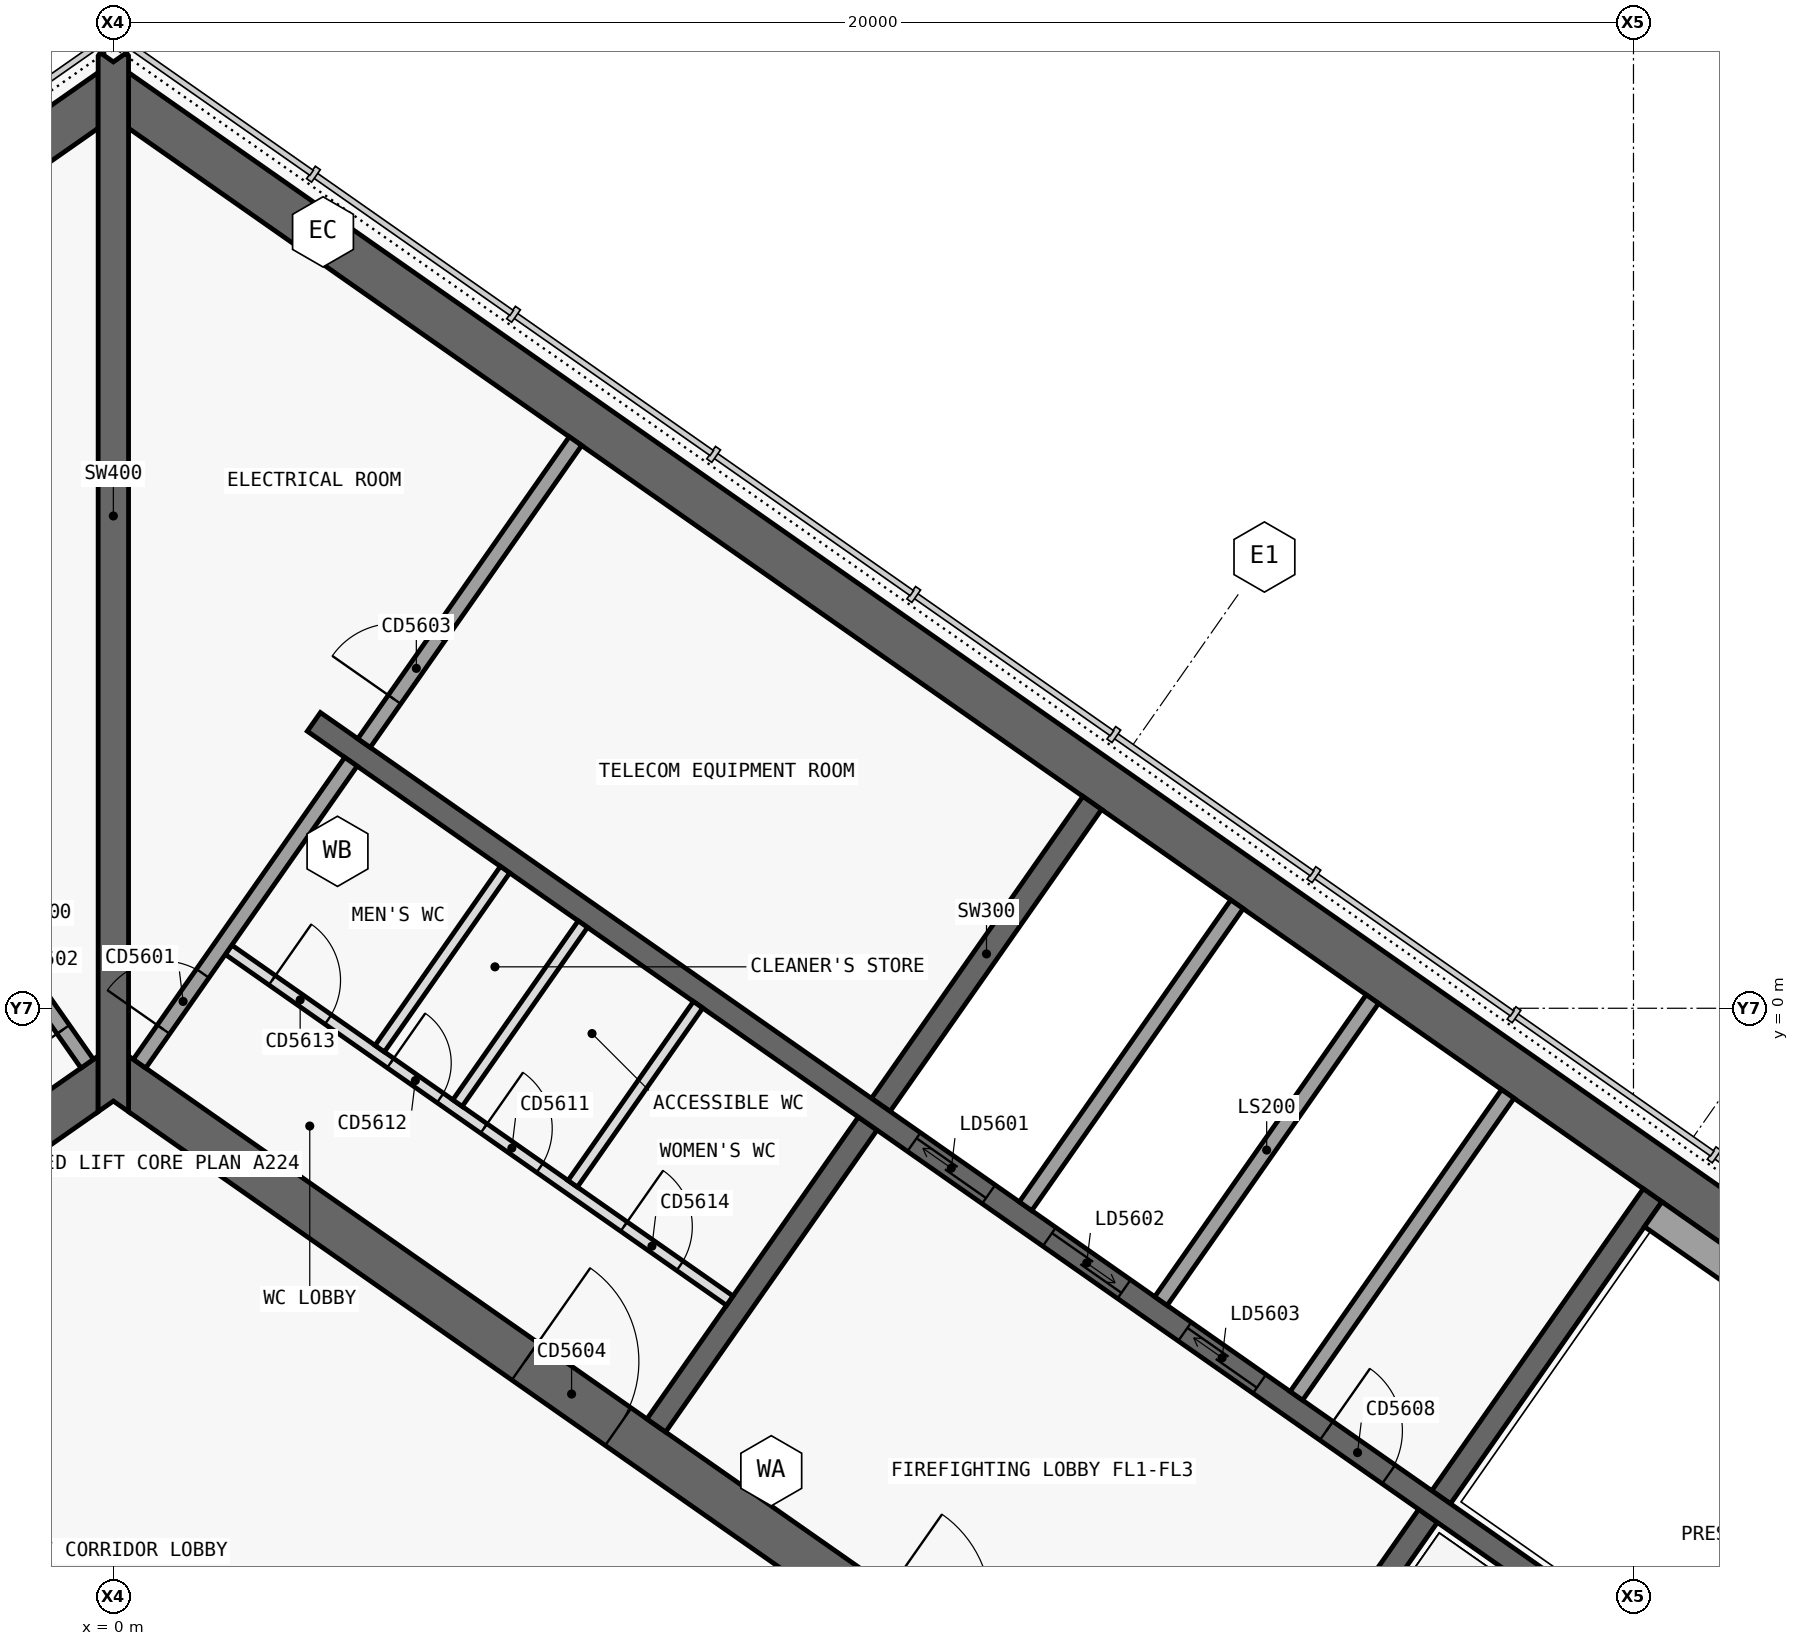
"""IFC4 building model, lengths in metres.
Left out: names, types, materials, properties, quantities, classifications, styles, units other than length and angle.
Written with IfcOpenShell. Run it as: python <this file> out.ifc"""

import sys

from ifc_helpers import new_model, si_unit, direction, frame, frame_2d, origin, place, context, subcontext, project, spatial, polyline, rectangle, outline, extrude, element, fill, save


model = new_model("IFC4")
c1 = context("Model", 3, precision=1e-05, world=origin(), true_north=direction((0.0, 1.0)))
c2 = subcontext(c1, "Body", "Model", "MODEL_VIEW")
j1 = project(units=[si_unit("LENGTHUNIT", "METRE"), si_unit("PLANEANGLEUNIT", "RADIAN")], contexts=[c1])
p1 = place(None, origin())
s1 = spatial("IfcSite", under=j1, at=p1, CompositionType="ELEMENT")
p2 = place(p1, origin())
s2 = spatial("IfcBuilding", under=s1, at=p2, CompositionType="ELEMENT")
p3 = place(p2, frame((0.0, 0.0, 313.3)))
s3 = spatial("IfcBuildingStorey", under=s2, at=p3, CompositionType="ELEMENT", Elevation=313.3)
p4 = place(p3, frame((-0.028, 12.066, 0.0), z_axis=(0.0, 0.0, 1.0), x_axis=(-0.819151382952, -0.573577380837, 0.0)))
e1 = element("IfcWall", 1, at=p4, inside=s3, PredefinedType="SHEAR", context=c2, shape_type="SweptSolid", body=[
    extrude(outline(polyline([(33.898, 0.3), (0.42, 0.3), (0.0, -0.3), (33.898, -0.3), (33.898, 0.3)])), origin(), (0.0, 0.0, 1.0), 5.5),
])
p5 = place(p3, frame((-0.028, -0.874, 0.0), z_axis=(0.0, 0.0, 1.0), x_axis=(-0.819150035022, -0.573579305871, 0.0)))
e2 = element("IfcWall", 2, at=p5, inside=s3, PredefinedType="SHEAR", context=c2, shape_type="SweptSolid", body=[
    extrude(outline(polyline([(26.476, 0.3), (0.42, 0.3), (0.0, -0.3), (26.476, -0.3), (26.476, 0.3)])), origin(), (0.0, 0.0, 1.0), 5.5),
])
p6 = place(p5, frame((3.676, 0.0, 0.0)))
e3 = element("IfcOpeningElement", 3, at=p6, cuts=e2, PredefinedType="OPENING", context=c2, shape_type="SweptSolid", body=[
    extrude(rectangle(XDim=1.2, YDim=2.1, at=frame_2d((0.6, 1.05))), frame((0.0, 0.31, 0.0), z_axis=(0.0, -1.0, 0.0), x_axis=(1.0, 0.0, 0.0)), (0.0, 0.0, 1.0), 0.62),
])
p7 = place(p5, frame((12.376, 0.0, 0.0)))
e4 = element("IfcOpeningElement", 4, at=p7, cuts=e2, PredefinedType="OPENING", context=c2, shape_type="SweptSolid", body=[
    extrude(rectangle(XDim=1.2, YDim=2.1, at=frame_2d((0.6, 1.05))), frame((0.0, 0.31, 0.0), z_axis=(0.0, -1.0, 0.0), x_axis=(1.0, 0.0, 0.0)), (0.0, 0.0, 1.0), 0.62),
])
p8 = place(p3, frame((0.028, 12.066, 0.0), z_axis=(0.0, 0.0, 1.0), x_axis=(0.819151382952, -0.573577380837, 0.0)))
e5 = element("IfcWall", 5, at=p8, inside=s3, PredefinedType="SHEAR", context=c2, shape_type="SweptSolid", body=[
    extrude(outline(polyline([(33.898, 0.3), (0.0, 0.3), (0.42, -0.3), (33.898, -0.3), (33.898, 0.3)])), origin(), (0.0, 0.0, 1.0), 5.5),
])
p9 = place(p3, frame((0.028, -0.874, 0.0), z_axis=(0.0, 0.0, 1.0), x_axis=(0.819150035022, -0.573579305871, 0.0)))
e6 = element("IfcWall", 6, at=p9, inside=s3, PredefinedType="SHEAR", context=c2, shape_type="SweptSolid", body=[
    extrude(outline(polyline([(26.476, 0.3), (0.0, 0.3), (0.42, -0.3), (26.476, -0.3), (26.476, 0.3)])), origin(), (0.0, 0.0, 1.0), 5.5),
])
p10 = place(p9, frame((6.576, 0.0, 0.0)))
e7 = element("IfcOpeningElement", 7, at=p10, cuts=e6, PredefinedType="OPENING", context=c2, shape_type="SweptSolid", body=[
    extrude(rectangle(XDim=1.5, YDim=2.1, at=frame_2d((0.75, 1.05))), frame((0.0, 0.31, 0.0), z_axis=(0.0, -1.0, 0.0), x_axis=(1.0, 0.0, 0.0)), (0.0, 0.0, 1.0), 0.62),
])
p11 = place(p9, frame((12.226, 0.0, 0.0)))
e8 = element("IfcOpeningElement", 8, at=p11, cuts=e6, PredefinedType="OPENING", context=c2, shape_type="SweptSolid", body=[
    extrude(rectangle(XDim=1.5, YDim=2.1, at=frame_2d((0.75, 1.05))), frame((0.0, 0.31, 0.0), z_axis=(0.0, -1.0, 0.0), x_axis=(1.0, 0.0, 0.0)), (0.0, 0.0, 1.0), 0.62),
])
p12 = place(p3, frame((7.143, -5.49, 0.0), z_axis=(0.0, 0.0, 1.0), x_axis=(0.573617744349, 0.819123118565, 0.0)))
e9 = element("IfcWall", 9, at=p12, inside=s3, PredefinedType="SHEAR", context=c2, shape_type="SweptSolid", body=[
    extrude(outline(polyline([(0.0, 0.15), (0.0, -0.15), (4.85, -0.15), (4.85, 0.15), (0.0, 0.15)])), origin(), (0.0, 0.0, 1.0), 5.5),
])
p13 = place(p3, frame((10.097, -1.271, 0.0), z_axis=(0.0, 0.0, 1.0), x_axis=(0.573560315113, 0.819163332265, 0.0)))
e10 = element("IfcWall", 10, at=p13, inside=s3, PredefinedType="SHEAR", context=c2, shape_type="SweptSolid", body=[
    extrude(outline(polyline([(4.85, -0.15), (4.85, 0.15), (0.0, 0.15), (0.0, -0.15), (4.85, -0.15)])), origin(), (0.0, 0.0, 1.0), 5.5),
])
p14 = place(p3, frame((14.515, -10.652, 0.0), z_axis=(0.0, 0.0, 1.0), x_axis=(0.573560315113, 0.819163332265, 0.0)))
e11 = element("IfcWall", 11, at=p14, inside=s3, PredefinedType="SHEAR", context=c2, shape_type="SweptSolid", body=[
    extrude(outline(polyline([(0.0, 0.15), (0.0, -0.15), (4.85, -0.15), (4.85, 0.15), (0.0, 0.15)])), origin(), (0.0, 0.0, 1.0), 5.5),
])
p15 = place(p3, frame((17.469, -6.433, 0.0), z_axis=(0.0, 0.0, 1.0), x_axis=(0.573594092424, 0.81913968109, 0.0)))
e12 = element("IfcWall", 12, at=p15, inside=s3, PredefinedType="SHEAR", context=c2, shape_type="SweptSolid", body=[
    extrude(outline(polyline([(4.85, -0.15), (4.85, 0.15), (0.0, 0.15), (0.0, -0.15), (4.85, -0.15)])), origin(), (0.0, 0.0, 1.0), 5.5),
])
p16 = place(p3, frame((2.638, 3.768, 0.0), z_axis=(0.0, 0.0, 1.0), x_axis=(0.819155014212, -0.573572194837, 0.0)))
e13 = element("IfcWall", 13, at=p16, inside=s3, PredefinedType="SHEAR", context=c2, shape_type="SweptSolid", body=[
    extrude(outline(polyline([(0.0, 0.15), (0.0, -0.15), (26.4, -0.15), (26.4, 0.15), (0.0, 0.15)])), origin(), (0.0, 0.0, 1.0), 5.5),
])
p17 = place(p16, frame((9.637, 0.0, 0.0)))
e14 = element("IfcOpeningElement", 14, at=p17, cuts=e13, PredefinedType="OPENING", context=c2, shape_type="SweptSolid", body=[
    extrude(rectangle(XDim=1.2, YDim=2.1, at=frame_2d((0.6, 1.05))), frame((0.0, 0.16, 0.0), z_axis=(0.0, -1.0, 0.0), x_axis=(1.0, 0.0, 0.0)), (0.0, 0.0, 1.0), 0.32),
])
p18 = place(p16, frame((11.812, 0.0, 0.0)))
e15 = element("IfcOpeningElement", 15, at=p18, cuts=e13, PredefinedType="OPENING", context=c2, shape_type="SweptSolid", body=[
    extrude(rectangle(XDim=1.2, YDim=2.1, at=frame_2d((0.6, 1.05))), frame((0.0, 0.16, 0.0), z_axis=(0.0, -1.0, 0.0), x_axis=(1.0, 0.0, 0.0)), (0.0, 0.0, 1.0), 0.32),
])
p19 = place(p16, frame((13.988, 0.0, 0.0)))
e16 = element("IfcOpeningElement", 16, at=p19, cuts=e13, PredefinedType="OPENING", context=c2, shape_type="SweptSolid", body=[
    extrude(rectangle(XDim=1.2, YDim=2.1, at=frame_2d((0.6, 1.05))), frame((0.0, 0.16, 0.0), z_axis=(0.0, -1.0, 0.0), x_axis=(1.0, 0.0, 0.0)), (0.0, 0.0, 1.0), 0.32),
])
p20 = place(p16, frame((16.262, 0.0, 0.0)))
e17 = element("IfcOpeningElement", 17, at=p20, cuts=e13, PredefinedType="OPENING", context=c2, shape_type="SweptSolid", body=[
    extrude(rectangle(XDim=1.0, YDim=2.1, at=frame_2d((0.5, 1.05))), frame((0.0, 0.16, 0.0), z_axis=(0.0, -1.0, 0.0), x_axis=(1.0, 0.0, 0.0)), (0.0, 0.0, 1.0), 0.32),
])
p21 = place(p3, frame((0.0, -1.361, 0.0), z_axis=(0.0, 0.0, 1.0), x_axis=(0.0, 1.0, 0.0)))
e18 = element("IfcWall", 18, at=p21, inside=s3, PredefinedType="SHEAR", context=c2, shape_type="SweptSolid", body=[
    extrude(outline(polyline([(0.14, 0.2), (0.0, 0.2), (0.14, 0.0), (0.0, -0.2), (0.14, -0.2), (1.012, -0.2), (12.94, -0.2), (13.813, -0.2), (13.893, -0.2), (13.933, -0.172), (13.813, 0.0), (13.933, 0.172), (13.893, 0.2), (13.813, 0.2), (12.94, 0.2), (1.012, 0.2), (0.14, 0.2)])), origin(), (0.0, 0.0, 1.0), 5.5),
])
p22 = place(p3, frame((12.001, -2.605, 0.0), z_axis=(0.0, 0.0, 1.0), x_axis=(0.573560315113, 0.819163332265, 0.0)))
e19 = element("IfcWall", 19, at=p22, inside=s3, PredefinedType="SOLIDWALL", context=c2, shape_type="SweptSolid", body=[
    extrude(rectangle(XDim=4.85, YDim=0.2, at=frame_2d((2.425, 0.0))), origin(), (0.0, 0.0, 1.0), 5.22),
])
p23 = place(p3, frame((13.783, -3.852, 0.0), z_axis=(0.0, 0.0, 1.0), x_axis=(0.573594092424, 0.81913968109, 0.0)))
e20 = element("IfcWall", 20, at=p23, inside=s3, PredefinedType="SOLIDWALL", context=c2, shape_type="SweptSolid", body=[
    extrude(rectangle(XDim=4.85, YDim=0.2, at=frame_2d((2.425, 0.0))), origin(), (0.0, 0.0, 1.0), 5.22),
])
p24 = place(p3, frame((15.565, -5.1, 0.0), z_axis=(0.0, 0.0, 1.0), x_axis=(0.573560315113, 0.819163332265, 0.0)))
e21 = element("IfcWall", 21, at=p24, inside=s3, PredefinedType="SOLIDWALL", context=c2, shape_type="SweptSolid", body=[
    extrude(rectangle(XDim=4.85, YDim=0.2, at=frame_2d((2.425, 0.0))), origin(), (0.0, 0.0, 1.0), 5.22),
])
p25 = place(p3, frame((1.516, 0.77, 0.0), z_axis=(0.0, 0.0, 1.0), x_axis=(0.819146424436, -0.573584462249, 0.0)))
e22 = element("IfcWall", 22, at=p25, inside=s3, PredefinedType="PARTITIONING", context=c2, shape_type="SweptSolid", body=[
    extrude(rectangle(XDim=8.05, YDim=0.15, at=frame_2d((4.025, 0.0))), origin(), (0.0, 0.0, 1.0), 5.22),
])
p26 = place(p25, frame((0.7, 0.0, 0.0)))
e23 = element("IfcOpeningElement", 23, at=p26, cuts=e22, PredefinedType="OPENING", context=c2, shape_type="SweptSolid", body=[
    extrude(rectangle(XDim=0.9, YDim=2.1, at=frame_2d((0.45, 1.05))), frame((0.0, 0.085, 0.0), z_axis=(0.0, -1.0, 0.0), x_axis=(1.0, 0.0, 0.0)), (0.0, 0.0, 1.0), 0.17),
])
p27 = place(p25, frame((2.6, 0.0, 0.0)))
e24 = element("IfcOpeningElement", 24, at=p27, cuts=e22, PredefinedType="OPENING", context=c2, shape_type="SweptSolid", body=[
    extrude(rectangle(XDim=0.8, YDim=2.1, at=frame_2d((0.4, 1.05))), frame((0.0, 0.085, 0.0), z_axis=(0.0, -1.0, 0.0), x_axis=(1.0, 0.0, 0.0)), (0.0, 0.0, 1.0), 0.17),
])
p28 = place(p25, frame((4.1, 0.0, 0.0)))
e25 = element("IfcOpeningElement", 25, at=p28, cuts=e22, PredefinedType="OPENING", context=c2, shape_type="SweptSolid", body=[
    extrude(rectangle(XDim=0.9, YDim=2.1, at=frame_2d((0.45, 1.05))), frame((0.0, 0.085, 0.0), z_axis=(0.0, -1.0, 0.0), x_axis=(1.0, 0.0, 0.0)), (0.0, 0.0, 1.0), 0.17),
])
p29 = place(p25, frame((6.35, 0.0, 0.0)))
e26 = element("IfcOpeningElement", 26, at=p29, cuts=e22, PredefinedType="OPENING", context=c2, shape_type="SweptSolid", body=[
    extrude(rectangle(XDim=0.9, YDim=2.1, at=frame_2d((0.45, 1.05))), frame((0.0, 0.085, 0.0), z_axis=(0.0, -1.0, 0.0), x_axis=(1.0, 0.0, 0.0)), (0.0, 0.0, 1.0), 0.17),
])
p30 = place(p3, frame((3.504, -0.531, 0.0), z_axis=(0.0, 0.0, 1.0), x_axis=(0.573582013179, 0.819148139324, 0.0)))
e27 = element("IfcWall", 27, at=p30, inside=s3, PredefinedType="PARTITIONING", context=c2, shape_type="SweptSolid", body=[
    extrude(rectangle(XDim=2.875, YDim=0.15, at=frame_2d((1.438, 0.0))), origin(), (0.0, 0.0, 1.0), 5.22),
])
p31 = place(p3, frame((4.528, -1.248, 0.0), z_axis=(0.0, 0.0, 1.0), x_axis=(0.573621911162, 0.819120200602, 0.0)))
e28 = element("IfcWall", 28, at=p31, inside=s3, PredefinedType="PARTITIONING", context=c2, shape_type="SweptSolid", body=[
    extrude(rectangle(XDim=2.875, YDim=0.15, at=frame_2d((1.438, 0.0))), origin(), (0.0, 0.0, 1.0), 5.22),
])
p32 = place(p3, frame((6.044, -2.309, 0.0), z_axis=(0.0, 0.0, 1.0), x_axis=(0.573564930514, 0.819160100642, 0.0)))
e29 = element("IfcWall", 29, at=p32, inside=s3, PredefinedType="PARTITIONING", context=c2, shape_type="SweptSolid", body=[
    extrude(rectangle(XDim=2.875, YDim=0.15, at=frame_2d((1.438, 0.0))), origin(), (0.0, 0.0, 1.0), 5.22),
])
p33 = place(p3, frame((20.259, -2.71, 0.0), z_axis=(0.0, 0.0, 1.0), x_axis=(0.81914849389, -0.573581506813, 0.0)))
e30 = element("IfcWall", 30, at=p33, inside=s3, PredefinedType="SOLIDWALL", context=c2, shape_type="SweptSolid", body=[
    extrude(rectangle(XDim=8.25, YDim=0.4, at=frame_2d((4.125, 0.0))), origin(), (0.0, 0.0, 1.0), 5.22),
])
p34 = place(p3, frame((-0.344, -0.729, 0.0), z_axis=(0.0, 0.0, 1.0), x_axis=(-0.573560315113, 0.819163332265, 0.0)))
e31 = element("IfcWall", 31, at=p34, inside=s3, PredefinedType="SOLIDWALL", context=c2, shape_type="SweptSolid", body=[
    extrude(rectangle(XDim=4.85, YDim=0.2, at=frame_2d((2.425, 0.0))), origin(), (0.0, 0.0, 1.0), 5.22),
])
p35 = place(p34, frame((0.55, 0.0, 0.0)))
e32 = element("IfcOpeningElement", 32, at=p35, cuts=e31, PredefinedType="OPENING", context=c2, shape_type="SweptSolid", body=[
    extrude(rectangle(XDim=0.9, YDim=2.1, at=frame_2d((0.45, 1.05))), frame((0.0, 0.11, 0.0), z_axis=(0.0, -1.0, 0.0), x_axis=(1.0, 0.0, 0.0)), (0.0, 0.0, 1.0), 0.22),
])
p36 = place(p3, frame((0.344, -0.729, 0.0), z_axis=(0.0, 0.0, 1.0), x_axis=(0.573560315113, 0.819163332265, 0.0)))
e33 = element("IfcWall", 33, at=p36, inside=s3, PredefinedType="SOLIDWALL", context=c2, shape_type="SweptSolid", body=[
    extrude(rectangle(XDim=4.85, YDim=0.2, at=frame_2d((2.425, 0.0))), origin(), (0.0, 0.0, 1.0), 5.22),
])
p37 = place(p36, frame((0.55, 0.0, 0.0)))
e34 = element("IfcOpeningElement", 34, at=p37, cuts=e33, PredefinedType="OPENING", context=c2, shape_type="SweptSolid", body=[
    extrude(rectangle(XDim=0.9, YDim=2.1, at=frame_2d((0.45, 1.05))), frame((0.0, 0.11, 0.0), z_axis=(0.0, -1.0, 0.0), x_axis=(1.0, 0.0, 0.0)), (0.0, 0.0, 1.0), 0.22),
])
p38 = place(p3, frame((3.298, 3.49, 0.0), z_axis=(0.0, 0.0, 1.0), x_axis=(0.573560315113, 0.819163332265, 0.0)))
e35 = element("IfcWall", 35, at=p38, inside=s3, PredefinedType="SOLIDWALL", context=c2, shape_type="SweptSolid", body=[
    extrude(rectangle(XDim=4.85, YDim=0.2, at=frame_2d((2.425, 0.0))), origin(), (0.0, 0.0, 1.0), 5.22),
])
p39 = place(p38, frame((0.7, 0.0, 0.0)))
e36 = element("IfcOpeningElement", 36, at=p39, cuts=e35, PredefinedType="OPENING", context=c2, shape_type="SweptSolid", body=[
    extrude(rectangle(XDim=1.0, YDim=2.1, at=frame_2d((0.5, 1.05))), frame((0.0, 0.11, 0.0), z_axis=(0.0, -1.0, 0.0), x_axis=(1.0, 0.0, 0.0)), (0.0, 0.0, 1.0), 0.22),
])
p40 = place(p17, origin())
e37 = element("IfcDoor", 37, at=p40, inside=s3, OperationType="SLIDING_TO_LEFT", PredefinedType="DOOR", context=c2, shape_type="SweptSolid", body=[
    extrude(rectangle(XDim=1.2, YDim=2.1, at=frame_2d((0.6, 1.05))), frame((0.0, 0.025, 0.0), z_axis=(0.0, -1.0, 0.0), x_axis=(1.0, 0.0, 0.0)), (0.0, 0.0, 1.0), 0.05),
])
fill(e14, e37)
p41 = place(p18, origin())
e38 = element("IfcDoor", 38, at=p41, inside=s3, OperationType="SLIDING_TO_RIGHT", PredefinedType="DOOR", context=c2, shape_type="SweptSolid", body=[
    extrude(rectangle(XDim=1.2, YDim=2.1, at=frame_2d((0.6, 1.05))), frame((0.0, 0.025, 0.0), z_axis=(0.0, -1.0, 0.0), x_axis=(1.0, 0.0, 0.0)), (0.0, 0.0, 1.0), 0.05),
])
fill(e15, e38)
p42 = place(p19, origin())
e39 = element("IfcDoor", 39, at=p42, inside=s3, OperationType="SLIDING_TO_LEFT", PredefinedType="DOOR", context=c2, shape_type="SweptSolid", body=[
    extrude(rectangle(XDim=1.2, YDim=2.1, at=frame_2d((0.6, 1.05))), frame((0.0, 0.025, 0.0), z_axis=(0.0, -1.0, 0.0), x_axis=(1.0, 0.0, 0.0)), (0.0, 0.0, 1.0), 0.05),
])
fill(e16, e39)
p43 = place(p20, origin())
e40 = element("IfcDoor", 40, at=p43, inside=s3, OperationType="SINGLE_SWING_RIGHT", PredefinedType="DOOR", context=c2, shape_type="SweptSolid", body=[
    extrude(rectangle(XDim=1.0, YDim=2.1, at=frame_2d((0.5, 1.05))), frame((0.0, 0.025, 0.0), z_axis=(0.0, -1.0, 0.0), x_axis=(1.0, 0.0, 0.0)), (0.0, 0.0, 1.0), 0.05),
])
fill(e17, e40)
p44 = place(p26, origin())
e41 = element("IfcDoor", 41, at=p44, inside=s3, OperationType="SINGLE_SWING_RIGHT", PredefinedType="DOOR", context=c2, shape_type="SweptSolid", body=[
    extrude(rectangle(XDim=0.9, YDim=2.1, at=frame_2d((0.45, 1.05))), frame((0.0, 0.025, 0.0), z_axis=(0.0, -1.0, 0.0), x_axis=(1.0, 0.0, 0.0)), (0.0, 0.0, 1.0), 0.05),
])
fill(e23, e41)
p45 = place(p27, origin())
e42 = element("IfcDoor", 42, at=p45, inside=s3, OperationType="SINGLE_SWING_RIGHT", PredefinedType="DOOR", context=c2, shape_type="SweptSolid", body=[
    extrude(rectangle(XDim=0.8, YDim=2.1, at=frame_2d((0.4, 1.05))), frame((0.0, 0.025, 0.0), z_axis=(0.0, -1.0, 0.0), x_axis=(1.0, 0.0, 0.0)), (0.0, 0.0, 1.0), 0.05),
])
fill(e24, e42)
p46 = place(p28, origin())
e43 = element("IfcDoor", 43, at=p46, inside=s3, OperationType="SINGLE_SWING_RIGHT", PredefinedType="DOOR", context=c2, shape_type="SweptSolid", body=[
    extrude(rectangle(XDim=0.9, YDim=2.1, at=frame_2d((0.45, 1.05))), frame((0.0, 0.025, 0.0), z_axis=(0.0, -1.0, 0.0), x_axis=(1.0, 0.0, 0.0)), (0.0, 0.0, 1.0), 0.05),
])
fill(e25, e43)
p47 = place(p29, origin())
e44 = element("IfcDoor", 44, at=p47, inside=s3, OperationType="SINGLE_SWING_RIGHT", PredefinedType="DOOR", context=c2, shape_type="SweptSolid", body=[
    extrude(rectangle(XDim=0.9, YDim=2.1, at=frame_2d((0.45, 1.05))), frame((0.0, 0.025, 0.0), z_axis=(0.0, -1.0, 0.0), x_axis=(1.0, 0.0, 0.0)), (0.0, 0.0, 1.0), 0.05),
])
fill(e26, e44)
p48 = place(p10, origin())
e45 = element("IfcDoor", 45, at=p48, inside=s3, OperationType="SINGLE_SWING_RIGHT", PredefinedType="DOOR", context=c2, shape_type="SweptSolid", body=[
    extrude(rectangle(XDim=1.5, YDim=2.1, at=frame_2d((0.75, 1.05))), frame((0.0, 0.025, 0.0), z_axis=(0.0, -1.0, 0.0), x_axis=(1.0, 0.0, 0.0)), (0.0, 0.0, 1.0), 0.05),
])
fill(e7, e45)
p49 = place(p35, origin())
e46 = element("IfcDoor", 46, at=p49, inside=s3, OperationType="SINGLE_SWING_RIGHT", PredefinedType="DOOR", context=c2, shape_type="SweptSolid", body=[
    extrude(rectangle(XDim=0.9, YDim=2.1, at=frame_2d((0.45, 1.05))), frame((0.0, 0.025, 0.0), z_axis=(0.0, -1.0, 0.0), x_axis=(1.0, 0.0, 0.0)), (0.0, 0.0, 1.0), 0.05),
])
fill(e32, e46)
p50 = place(p37, origin())
e47 = element("IfcDoor", 47, at=p50, inside=s3, OperationType="SINGLE_SWING_RIGHT", PredefinedType="DOOR", context=c2, shape_type="SweptSolid", body=[
    extrude(rectangle(XDim=0.9, YDim=2.1, at=frame_2d((0.45, 1.05))), frame((0.0, 0.025, 0.0), z_axis=(0.0, -1.0, 0.0), x_axis=(1.0, 0.0, 0.0)), (0.0, 0.0, 1.0), 0.05),
])
fill(e34, e47)
p51 = place(p39, origin())
e48 = element("IfcDoor", 48, at=p51, inside=s3, OperationType="SINGLE_SWING_RIGHT", PredefinedType="DOOR", context=c2, shape_type="SweptSolid", body=[
    extrude(rectangle(XDim=1.0, YDim=2.1, at=frame_2d((0.5, 1.05))), frame((0.0, 0.025, 0.0), z_axis=(0.0, -1.0, 0.0), x_axis=(1.0, 0.0, 0.0)), (0.0, 0.0, 1.0), 0.05),
])
fill(e36, e48)
save(model, sys.argv[1])
